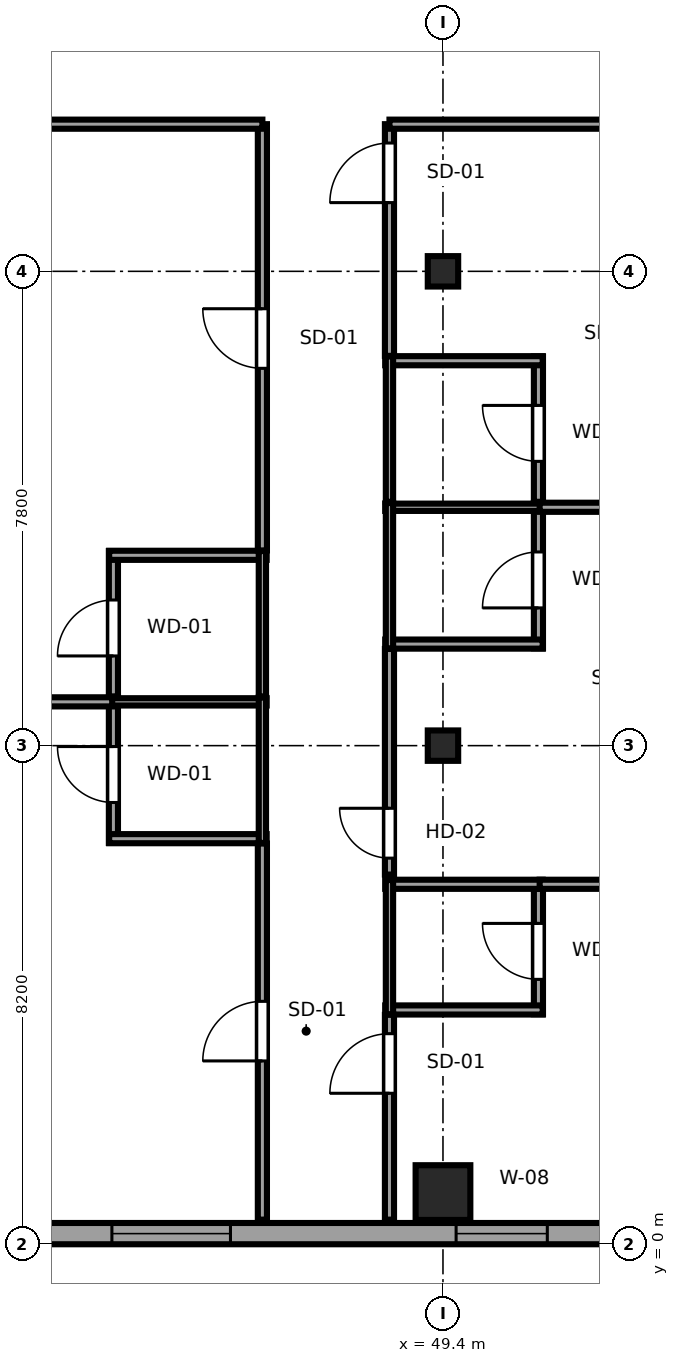
"""IFC4 building model, lengths in metres.
Left out: names, types, materials, properties, quantities, classifications, styles, units other than length and angle.
Written with IfcOpenShell. Run it as: python <this file> out.ifc"""

import sys

from ifc_helpers import new_model, si_unit, direction, frame, frame_2d, origin, origin_2d, place, context, subcontext, project, spatial, rectangle, i_section, extrude, source, transform, mapped, element, fill, save


model = new_model("IFC4")
c1 = context("Model", 3, precision=1e-05, world=origin(), true_north=direction((0.0, 1.0)))
c2 = subcontext(c1, "Body", "Model", "MODEL_VIEW")
j1 = project(units=[si_unit("LENGTHUNIT", "METRE"), si_unit("PLANEANGLEUNIT", "RADIAN")], contexts=[c1])
p1 = place(None, origin())
s1 = spatial("IfcSite", under=j1, at=p1, CompositionType="ELEMENT")
p2 = place(p1, origin())
s2 = spatial("IfcBuilding", under=s1, at=p2, CompositionType="ELEMENT")
p3 = place(p2, frame((0.0, 0.0, 100.9)))
s3 = spatial("IfcBuildingStorey", under=s2, at=p3, CompositionType="ELEMENT", Elevation=100.9)
m1 = source(origin(), c2, "Body", "SweptSolid", [
    extrude(rectangle(XDim=0.9, YDim=0.9, at=origin_2d()), origin(), (0.0, 0.0, 1.0), 3.55),
])
p4 = place(p3, frame((49.4, 0.85, 0.0), z_axis=(0.0, 0.0, 1.0), x_axis=(1.0, 0.0, 0.0)))
e1 = element("IfcColumn", 1, at=p4, inside=s3, PredefinedType="COLUMN", context=c2, shape_type="MappedRepresentation", body=[
    mapped(m1, transform((0.0, 0.0, 0.0), x_axis=(1.0, 0.0, 0.0), y_axis=(0.0, 1.0, 0.0), z_axis=(0.0, 0.0, 1.0), scale=1.0)),
])
m2 = source(origin(), c2, "Body", "SweptSolid", [
    extrude(i_section(OverallWidth=0.5, OverallDepth=0.5, WebThickness=0.022, FlangeThickness=0.034, at=origin_2d()), origin(), (0.0, 0.0, 1.0), 3.55),
])
for number, where, z_axis, x_axis in (
    (2, (49.4, 8.2, 0.0), (0.0, 0.0, 1.0), (1.0, 0.0, 0.0)),
    (3, (49.4, 16.0, 0.0), (0.0, 0.0, 1.0), (1.0, 0.0, 0.0)),
):
    element("IfcColumn", number, at=place(p3, frame(where, z_axis=z_axis, x_axis=x_axis)), inside=s3, PredefinedType="COLUMN", context=c2, shape_type="MappedRepresentation", body=[
        mapped(m2, transform((0.0, 0.0, 0.0), x_axis=(1.0, 0.0, 0.0), y_axis=(0.0, 1.0, 0.0), z_axis=(0.0, 0.0, 1.0), scale=1.0)),
    ])
p5 = place(p3, frame((34.375, 0.175, 0.0), z_axis=(0.0, 0.0, 1.0), x_axis=(1.0, 0.0, 0.0)))
e4 = element("IfcWall", 4, at=p5, inside=s3, PredefinedType="SOLIDWALL", context=c2, shape_type="SweptSolid", body=[
    extrude(rectangle(XDim=18.008, YDim=0.35, at=frame_2d((9.004, 0.0))), origin(), (0.0, 0.0, 1.0), 3.37),
])
p6 = place(p5, frame((1.726, 0.0, 0.68)))
e5 = element("IfcOpeningElement", 5, at=p6, cuts=e4, PredefinedType="OPENING", context=c2, shape_type="SweptSolid", body=[
    extrude(rectangle(XDim=1.95, YDim=1.82, at=frame_2d((0.975, 0.91))), frame((0.0, 0.185, 0.0), z_axis=(0.0, -1.0, 0.0), x_axis=(1.0, 0.0, 0.0)), (0.0, 0.0, 1.0), 0.37),
])
p7 = place(p5, frame((9.58, 0.0, 0.68)))
e6 = element("IfcOpeningElement", 6, at=p7, cuts=e4, PredefinedType="OPENING", context=c2, shape_type="SweptSolid", body=[
    extrude(rectangle(XDim=1.95, YDim=1.82, at=frame_2d((0.975, 0.91))), frame((0.0, 0.185, 0.0), z_axis=(0.0, -1.0, 0.0), x_axis=(1.0, 0.0, 0.0)), (0.0, 0.0, 1.0), 0.37),
])
p8 = place(p5, frame((15.241, 0.0, 0.62)))
e7 = element("IfcOpeningElement", 7, at=p8, cuts=e4, PredefinedType="OPENING", context=c2, shape_type="SweptSolid", body=[
    extrude(rectangle(XDim=1.5, YDim=1.55, at=frame_2d((0.75, 0.775))), frame((0.0, 0.185, 0.0), z_axis=(0.0, -1.0, 0.0), x_axis=(1.0, 0.0, 0.0)), (0.0, 0.0, 1.0), 0.37),
])
p9 = place(p3, frame((43.98, 6.6, 0.0), z_axis=(0.0, 0.0, 1.0), x_axis=(0.0, 1.0, 0.0)))
e8 = element("IfcWall", 8, at=p9, inside=s3, PredefinedType="PARTITIONING", context=c2, shape_type="SweptSolid", body=[
    extrude(rectangle(XDim=2.39, YDim=0.15, at=frame_2d((1.195, 0.0))), origin(), (0.0, 0.0, 1.0), 3.37),
])
p10 = place(p9, frame((0.665, 0.0, 0.0)))
e9 = element("IfcOpeningElement", 9, at=p10, cuts=e8, PredefinedType="OPENING", context=c2, shape_type="SweptSolid", body=[
    extrude(rectangle(XDim=0.92, YDim=2.01, at=frame_2d((0.46, 1.005))), frame((0.0, 0.085, 0.0), z_axis=(0.0, -1.0, 0.0), x_axis=(1.0, 0.0, 0.0)), (0.0, 0.0, 1.0), 0.17),
])
p11 = place(p3, frame((43.91, 6.67, 0.0), z_axis=(0.0, 0.0, 1.0), x_axis=(1.0, 0.0, 0.0)))
e10 = element("IfcWall", 10, at=p11, inside=s3, PredefinedType="PARTITIONING", context=c2, shape_type="SweptSolid", body=[
    extrude(rectangle(XDim=2.59, YDim=0.15, at=frame_2d((1.295, 0.0))), origin(), (0.0, 0.0, 1.0), 3.37),
])
p12 = place(p3, frame((43.91, 8.92, 0.0), z_axis=(0.0, 0.0, 1.0), x_axis=(1.0, 0.0, 0.0)))
e11 = element("IfcWall", 11, at=p12, inside=s3, PredefinedType="PLUMBINGWALL", context=c2, shape_type="SweptSolid", body=[
    extrude(rectangle(XDim=2.59, YDim=0.12, at=frame_2d((1.295, 0.0))), origin(), (0.0, 0.0, 1.0), 3.37),
])
p13 = place(p3, frame((46.43, 6.6, 0.0), z_axis=(0.0, 0.0, 1.0), x_axis=(0.0, 1.0, 0.0)))
e12 = element("IfcWall", 12, at=p13, inside=s3, PredefinedType="PLUMBINGWALL", context=c2, shape_type="SweptSolid", body=[
    extrude(rectangle(XDim=2.39, YDim=0.12, at=frame_2d((1.195, 0.0))), origin(), (0.0, 0.0, 1.0), 3.37),
])
p14 = place(p3, frame((43.98, 9.01, 0.0), z_axis=(0.0, 0.0, 1.0), x_axis=(0.0, 1.0, 0.0)))
e13 = element("IfcWall", 13, at=p14, inside=s3, PredefinedType="PARTITIONING", context=c2, shape_type="SweptSolid", body=[
    extrude(rectangle(XDim=2.39, YDim=0.15, at=frame_2d((1.195, 0.0))), origin(), (0.0, 0.0, 1.0), 3.37),
])
p15 = place(p14, frame((0.665, 0.0, 0.0)))
e14 = element("IfcOpeningElement", 14, at=p15, cuts=e13, PredefinedType="OPENING", context=c2, shape_type="SweptSolid", body=[
    extrude(rectangle(XDim=0.92, YDim=2.01, at=frame_2d((0.46, 1.005))), frame((0.0, 0.085, 0.0), z_axis=(0.0, -1.0, 0.0), x_axis=(1.0, 0.0, 0.0)), (0.0, 0.0, 1.0), 0.17),
])
p16 = place(p3, frame((43.91, 11.33, 0.0), z_axis=(0.0, 0.0, 1.0), x_axis=(1.0, 0.0, 0.0)))
e15 = element("IfcWall", 15, at=p16, inside=s3, PredefinedType="PARTITIONING", context=c2, shape_type="SweptSolid", body=[
    extrude(rectangle(XDim=2.59, YDim=0.15, at=frame_2d((1.295, 0.0))), origin(), (0.0, 0.0, 1.0), 3.37),
])
p17 = place(p3, frame((46.43, 9.01, 0.0), z_axis=(0.0, 0.0, 1.0), x_axis=(0.0, 1.0, 0.0)))
e16 = element("IfcWall", 16, at=p17, inside=s3, PredefinedType="PLUMBINGWALL", context=c2, shape_type="SweptSolid", body=[
    extrude(rectangle(XDim=2.39, YDim=0.12, at=frame_2d((1.195, 0.0))), origin(), (0.0, 0.0, 1.0), 3.37),
])
p18 = place(p3, frame((50.97, 3.783, 0.0), z_axis=(0.0, 0.0, 1.0), x_axis=(0.0, 1.0, 0.0)))
e17 = element("IfcWall", 17, at=p18, inside=s3, PredefinedType="PARTITIONING", context=c2, shape_type="SweptSolid", body=[
    extrude(rectangle(XDim=2.207, YDim=0.15, at=frame_2d((1.104, 0.0))), origin(), (0.0, 0.0, 1.0), 3.37),
])
p19 = place(p18, frame((0.573, 0.0, 0.0)))
e18 = element("IfcOpeningElement", 18, at=p19, cuts=e17, PredefinedType="OPENING", context=c2, shape_type="SweptSolid", body=[
    extrude(rectangle(XDim=0.92, YDim=2.01, at=frame_2d((0.46, 1.005))), frame((0.0, 0.085, 0.0), z_axis=(0.0, -1.0, 0.0), x_axis=(1.0, 0.0, 0.0)), (0.0, 0.0, 1.0), 0.17),
])
for number, where, z_axis, x_axis in (
    (19, (48.45, 3.853, 0.0), (0.0, 0.0, 1.0), (1.0, 0.0, 0.0)),
    (20, (48.45, 5.92, 0.0), (0.0, 0.0, 1.0), (1.0, 0.0, 0.0)),
):
    element("IfcWall", number, at=place(p3, frame(where, z_axis=z_axis, x_axis=x_axis)), inside=s3, PredefinedType="PARTITIONING", context=c2, shape_type="SweptSolid", body=[
        extrude(rectangle(XDim=2.59, YDim=0.15, at=frame_2d((1.295, 0.0))), origin(), (0.0, 0.0, 1.0), 3.37),
    ])
p20 = place(p3, frame((48.52, 3.783, 0.0), z_axis=(0.0, 0.0, 1.0), x_axis=(0.0, 1.0, 0.0)))
e21 = element("IfcWall", 21, at=p20, inside=s3, PredefinedType="PLUMBINGWALL", context=c2, shape_type="SweptSolid", body=[
    extrude(rectangle(XDim=2.207, YDim=0.12, at=frame_2d((1.104, 0.0))), origin(), (0.0, 0.0, 1.0), 3.37),
])
p21 = place(p3, frame((50.97, 9.8, 0.0), z_axis=(0.0, 0.0, 1.0), x_axis=(0.0, 1.0, 0.0)))
e22 = element("IfcWall", 22, at=p21, inside=s3, PredefinedType="PARTITIONING", context=c2, shape_type="SweptSolid", body=[
    extrude(rectangle(XDim=2.39, YDim=0.15, at=frame_2d((1.195, 0.0))), origin(), (0.0, 0.0, 1.0), 3.37),
])
p22 = place(p21, frame((0.665, 0.0, 0.0)))
e23 = element("IfcOpeningElement", 23, at=p22, cuts=e22, PredefinedType="OPENING", context=c2, shape_type="SweptSolid", body=[
    extrude(rectangle(XDim=0.92, YDim=2.01, at=frame_2d((0.46, 1.005))), frame((0.0, 0.085, 0.0), z_axis=(0.0, -1.0, 0.0), x_axis=(1.0, 0.0, 0.0)), (0.0, 0.0, 1.0), 0.17),
])
p23 = place(p3, frame((48.45, 9.87, 0.0), z_axis=(0.0, 0.0, 1.0), x_axis=(1.0, 0.0, 0.0)))
e24 = element("IfcWall", 24, at=p23, inside=s3, PredefinedType="PARTITIONING", context=c2, shape_type="SweptSolid", body=[
    extrude(rectangle(XDim=2.59, YDim=0.15, at=frame_2d((1.295, 0.0))), origin(), (0.0, 0.0, 1.0), 3.37),
])
p24 = place(p3, frame((48.45, 12.12, 0.0), z_axis=(0.0, 0.0, 1.0), x_axis=(1.0, 0.0, 0.0)))
e25 = element("IfcWall", 25, at=p24, inside=s3, PredefinedType="PLUMBINGWALL", context=c2, shape_type="SweptSolid", body=[
    extrude(rectangle(XDim=2.59, YDim=0.12, at=frame_2d((1.295, 0.0))), origin(), (0.0, 0.0, 1.0), 3.37),
])
p25 = place(p3, frame((48.52, 9.8, 0.0), z_axis=(0.0, 0.0, 1.0), x_axis=(0.0, 1.0, 0.0)))
e26 = element("IfcWall", 26, at=p25, inside=s3, PredefinedType="PLUMBINGWALL", context=c2, shape_type="SweptSolid", body=[
    extrude(rectangle(XDim=2.39, YDim=0.12, at=frame_2d((1.195, 0.0))), origin(), (0.0, 0.0, 1.0), 3.37),
])
p26 = place(p3, frame((50.97, 12.21, 0.0), z_axis=(0.0, 0.0, 1.0), x_axis=(0.0, 1.0, 0.0)))
e27 = element("IfcWall", 27, at=p26, inside=s3, PredefinedType="PARTITIONING", context=c2, shape_type="SweptSolid", body=[
    extrude(rectangle(XDim=2.39, YDim=0.15, at=frame_2d((1.195, 0.0))), origin(), (0.0, 0.0, 1.0), 3.37),
])
p27 = place(p26, frame((0.665, 0.0, 0.0)))
e28 = element("IfcOpeningElement", 28, at=p27, cuts=e27, PredefinedType="OPENING", context=c2, shape_type="SweptSolid", body=[
    extrude(rectangle(XDim=0.92, YDim=2.01, at=frame_2d((0.46, 1.005))), frame((0.0, 0.085, 0.0), z_axis=(0.0, -1.0, 0.0), x_axis=(1.0, 0.0, 0.0)), (0.0, 0.0, 1.0), 0.17),
])
p28 = place(p3, frame((48.45, 14.53, 0.0), z_axis=(0.0, 0.0, 1.0), x_axis=(1.0, 0.0, 0.0)))
e29 = element("IfcWall", 29, at=p28, inside=s3, PredefinedType="PARTITIONING", context=c2, shape_type="SweptSolid", body=[
    extrude(rectangle(XDim=2.59, YDim=0.15, at=frame_2d((1.295, 0.0))), origin(), (0.0, 0.0, 1.0), 3.37),
])
p29 = place(p3, frame((48.52, 12.21, 0.0), z_axis=(0.0, 0.0, 1.0), x_axis=(0.0, 1.0, 0.0)))
e30 = element("IfcWall", 30, at=p29, inside=s3, PredefinedType="PLUMBINGWALL", context=c2, shape_type="SweptSolid", body=[
    extrude(rectangle(XDim=2.39, YDim=0.12, at=frame_2d((1.195, 0.0))), origin(), (0.0, 0.0, 1.0), 3.37),
])
p30 = place(p3, frame((46.43, 0.405, 0.0), z_axis=(0.0, 0.0, 1.0), x_axis=(0.0, 1.0, 0.0)))
e31 = element("IfcWall", 31, at=p30, inside=s3, PredefinedType="PARTITIONING", context=c2, shape_type="SweptSolid", body=[
    extrude(rectangle(XDim=6.185, YDim=0.15, at=frame_2d((3.093, 0.0))), origin(), (0.0, 0.0, 1.0), 3.37),
])
p31 = place(p30, frame((2.61, 0.0, 0.0)))
e32 = element("IfcOpeningElement", 32, at=p31, cuts=e31, PredefinedType="OPENING", context=c2, shape_type="SweptSolid", body=[
    extrude(rectangle(XDim=0.98, YDim=2.12, at=frame_2d((0.49, 1.06))), frame((0.0, 0.085, 0.0), z_axis=(0.0, -1.0, 0.0), x_axis=(1.0, 0.0, 0.0)), (0.0, 0.0, 1.0), 0.17),
])
p32 = place(p3, frame((34.65, 8.92, 0.0), z_axis=(0.0, 0.0, 1.0), x_axis=(1.0, 0.0, 0.0)))
e33 = element("IfcWall", 33, at=p32, inside=s3, PredefinedType="PARTITIONING", context=c2, shape_type="SweptSolid", body=[
    extrude(rectangle(XDim=9.31, YDim=0.15, at=frame_2d((4.655, 0.0))), origin(), (0.0, 0.0, 1.0), 3.37),
])
p33 = place(p3, frame((46.43, 11.41, 0.0), z_axis=(0.0, 0.0, 1.0), x_axis=(0.0, 1.0, 0.0)))
e34 = element("IfcWall", 34, at=p33, inside=s3, PredefinedType="PARTITIONING", context=c2, shape_type="SweptSolid", body=[
    extrude(rectangle(XDim=7.01, YDim=0.15, at=frame_2d((3.505, 0.0))), origin(), (0.0, 0.0, 1.0), 3.37),
])
p34 = place(p33, frame((2.995, 0.0, 0.0)))
e35 = element("IfcOpeningElement", 35, at=p34, cuts=e34, PredefinedType="OPENING", context=c2, shape_type="SweptSolid", body=[
    extrude(rectangle(XDim=0.98, YDim=2.12, at=frame_2d((0.49, 1.06))), frame((0.0, 0.085, 0.0), z_axis=(0.0, -1.0, 0.0), x_axis=(1.0, 0.0, 0.0)), (0.0, 0.0, 1.0), 0.17),
])
p35 = place(p3, frame((34.65, 18.42, 0.0), z_axis=(0.0, 0.0, 1.0), x_axis=(1.0, 0.0, 0.0)))
e36 = element("IfcWall", 36, at=p35, inside=s3, PredefinedType="PARTITIONING", context=c2, shape_type="SweptSolid", body=[
    extrude(rectangle(XDim=11.78, YDim=0.15, at=frame_2d((5.89, 0.0))), origin(), (0.0, 0.0, 1.0), 3.37),
])
p36 = place(p3, frame((48.52, 0.405, 0.0), z_axis=(0.0, 0.0, 1.0), x_axis=(0.0, 1.0, 0.0)))
e37 = element("IfcWall", 37, at=p36, inside=s3, PredefinedType="PARTITIONING", context=c2, shape_type="SweptSolid", body=[
    extrude(rectangle(XDim=3.368, YDim=0.15, at=frame_2d((1.684, 0.0))), origin(), (0.0, 0.0, 1.0), 3.37),
])
p37 = place(p36, frame((2.078, 0.0, 0.0)))
e38 = element("IfcOpeningElement", 38, at=p37, cuts=e37, PredefinedType="OPENING", context=c2, shape_type="SweptSolid", body=[
    extrude(rectangle(XDim=0.98, YDim=2.12, at=frame_2d((0.49, 1.06))), frame((0.0, 0.085, 0.0), z_axis=(0.0, -1.0, 0.0), x_axis=(1.0, 0.0, 0.0)), (0.0, 0.0, 1.0), 0.17),
])
p38 = place(p3, frame((50.99, 5.92, 0.0), z_axis=(0.0, 0.0, 1.0), x_axis=(1.0, 0.0, 0.0)))
e39 = element("IfcWall", 39, at=p38, inside=s3, PredefinedType="PARTITIONING", context=c2, shape_type="SweptSolid", body=[
    extrude(rectangle(XDim=5.605, YDim=0.15, at=frame_2d((2.802, 0.0))), origin(), (0.0, 0.0, 1.0), 3.37),
])
p39 = place(p3, frame((48.52, 6.08, 0.0), z_axis=(0.0, 0.0, 1.0), x_axis=(0.0, 1.0, 0.0)))
e40 = element("IfcWall", 40, at=p39, inside=s3, PredefinedType="PARTITIONING", context=c2, shape_type="SweptSolid", body=[
    extrude(rectangle(XDim=3.71, YDim=0.15, at=frame_2d((1.855, 0.0))), origin(), (0.0, 0.0, 1.0), 3.37),
])
p40 = place(p39, frame((0.27, 0.0, 0.0)))
e41 = element("IfcOpeningElement", 41, at=p40, cuts=e40, PredefinedType="OPENING", context=c2, shape_type="SweptSolid", body=[
    extrude(rectangle(XDim=0.82, YDim=2.01, at=frame_2d((0.41, 1.005))), frame((0.0, 0.085, 0.0), z_axis=(0.0, -1.0, 0.0), x_axis=(1.0, 0.0, 0.0)), (0.0, 0.0, 1.0), 0.17),
])
p41 = place(p3, frame((50.99, 12.12, 0.0), z_axis=(0.0, 0.0, 1.0), x_axis=(1.0, 0.0, 0.0)))
e42 = element("IfcWall", 42, at=p41, inside=s3, PredefinedType="PARTITIONING", context=c2, shape_type="SweptSolid", body=[
    extrude(rectangle(XDim=5.605, YDim=0.15, at=frame_2d((2.802, 0.0))), origin(), (0.0, 0.0, 1.0), 3.37),
])
p42 = place(p3, frame((48.52, 14.61, 0.0), z_axis=(0.0, 0.0, 1.0), x_axis=(0.0, 1.0, 0.0)))
e43 = element("IfcWall", 43, at=p42, inside=s3, PredefinedType="PARTITIONING", context=c2, shape_type="SweptSolid", body=[
    extrude(rectangle(XDim=3.81, YDim=0.15, at=frame_2d((1.905, 0.0))), origin(), (0.0, 0.0, 1.0), 3.37),
])
p43 = place(p42, frame((2.52, 0.0, 0.0)))
e44 = element("IfcOpeningElement", 44, at=p43, cuts=e43, PredefinedType="OPENING", context=c2, shape_type="SweptSolid", body=[
    extrude(rectangle(XDim=0.98, YDim=2.12, at=frame_2d((0.49, 1.06))), frame((0.0, 0.085, 0.0), z_axis=(0.0, -1.0, 0.0), x_axis=(1.0, 0.0, 0.0)), (0.0, 0.0, 1.0), 0.17),
])
p44 = place(p3, frame((48.52, 18.42, 0.0), z_axis=(0.0, 0.0, 1.0), x_axis=(1.0, 0.0, 0.0)))
e45 = element("IfcWall", 45, at=p44, inside=s3, PredefinedType="PARTITIONING", context=c2, shape_type="SweptSolid", body=[
    extrude(rectangle(XDim=8.075, YDim=0.15, at=frame_2d((4.038, 0.0))), origin(), (0.0, 0.0, 1.0), 3.37),
])
m3 = source(origin(), c2, "Body", "SweptSolid", [
    extrude(rectangle(XDim=1.95, YDim=1.82, at=frame_2d((0.975, 0.91))), frame((0.0, 0.09, 0.0), z_axis=(0.0, -1.0, 0.0), x_axis=(1.0, 0.0, 0.0)), (0.0, 0.0, 1.0), 0.06),
])
p45 = place(p7, origin())
e46 = element("IfcWindow", 46, at=p45, inside=s3, PartitioningType="DOUBLE_PANEL_VERTICAL", PredefinedType="WINDOW", context=c2, shape_type="MappedRepresentation", body=[
    mapped(m3, transform((0.0, 0.0, 0.0), x_axis=(1.0, 0.0, 0.0), y_axis=(0.0, 1.0, 0.0), z_axis=(0.0, 0.0, 1.0), scale=1.0)),
])
fill(e6, e46)
m4 = source(origin(), c2, "Body", "SweptSolid", [
    extrude(rectangle(XDim=1.5, YDim=1.55, at=frame_2d((0.75, 0.775))), frame((0.0, 0.09, 0.0), z_axis=(0.0, -1.0, 0.0), x_axis=(1.0, 0.0, 0.0)), (0.0, 0.0, 1.0), 0.06),
])
p46 = place(p8, origin())
e47 = element("IfcWindow", 47, at=p46, inside=s3, PartitioningType="SINGLE_PANEL", PredefinedType="WINDOW", context=c2, shape_type="MappedRepresentation", body=[
    mapped(m4, transform((0.0, 0.0, 0.0), x_axis=(1.0, 0.0, 0.0), y_axis=(0.0, 1.0, 0.0), z_axis=(0.0, 0.0, 1.0), scale=1.0)),
])
fill(e7, e47)
m5 = source(origin(), c2, "Body", "SweptSolid", [
    extrude(rectangle(XDim=0.92, YDim=2.01, at=frame_2d((0.46, 1.005))), frame((0.0, 0.025, 0.0), z_axis=(0.0, -1.0, 0.0), x_axis=(1.0, 0.0, 0.0)), (0.0, 0.0, 1.0), 0.05),
])
p47 = place(p10, origin())
e48 = element("IfcDoor", 48, at=p47, inside=s3, OperationType="SINGLE_SWING_RIGHT", PredefinedType="DOOR", context=c2, shape_type="MappedRepresentation", body=[
    mapped(m5, transform((0.0, 0.0, 0.0), x_axis=(1.0, 0.0, 0.0), y_axis=(0.0, 1.0, 0.0), z_axis=(0.0, 0.0, 1.0), scale=1.0)),
])
fill(e9, e48)
p48 = place(p15, origin())
e49 = element("IfcDoor", 49, at=p48, inside=s3, OperationType="SINGLE_SWING_LEFT", PredefinedType="DOOR", context=c2, shape_type="MappedRepresentation", body=[
    mapped(m5, transform((0.0, 0.0, 0.0), x_axis=(1.0, 0.0, 0.0), y_axis=(0.0, 1.0, 0.0), z_axis=(0.0, 0.0, 1.0), scale=1.0)),
])
fill(e14, e49)
p49 = place(p19, origin())
e50 = element("IfcDoor", 50, at=p49, inside=s3, OperationType="SINGLE_SWING_RIGHT", PredefinedType="DOOR", context=c2, shape_type="MappedRepresentation", body=[
    mapped(m5, transform((0.0, 0.0, 0.0), x_axis=(1.0, 0.0, 0.0), y_axis=(0.0, 1.0, 0.0), z_axis=(0.0, 0.0, 1.0), scale=1.0)),
])
fill(e18, e50)
p50 = place(p22, origin())
e51 = element("IfcDoor", 51, at=p50, inside=s3, OperationType="SINGLE_SWING_LEFT", PredefinedType="DOOR", context=c2, shape_type="MappedRepresentation", body=[
    mapped(m5, transform((0.0, 0.0, 0.0), x_axis=(1.0, 0.0, 0.0), y_axis=(0.0, 1.0, 0.0), z_axis=(0.0, 0.0, 1.0), scale=1.0)),
])
fill(e23, e51)
p51 = place(p27, origin())
e52 = element("IfcDoor", 52, at=p51, inside=s3, OperationType="SINGLE_SWING_RIGHT", PredefinedType="DOOR", context=c2, shape_type="MappedRepresentation", body=[
    mapped(m5, transform((0.0, 0.0, 0.0), x_axis=(1.0, 0.0, 0.0), y_axis=(0.0, 1.0, 0.0), z_axis=(0.0, 0.0, 1.0), scale=1.0)),
])
fill(e28, e52)
m6 = source(origin(), c2, "Body", "SweptSolid", [
    extrude(rectangle(XDim=0.98, YDim=2.12, at=frame_2d((0.49, 1.06))), frame((0.0, 0.025, 0.0), z_axis=(0.0, -1.0, 0.0), x_axis=(1.0, 0.0, 0.0)), (0.0, 0.0, 1.0), 0.05),
])
p52 = place(p31, origin())
e53 = element("IfcDoor", 53, at=p52, inside=s3, OperationType="SINGLE_SWING_LEFT", PredefinedType="DOOR", context=c2, shape_type="MappedRepresentation", body=[
    mapped(m6, transform((0.0, 0.0, 0.0), x_axis=(1.0, 0.0, 0.0), y_axis=(0.0, 1.0, 0.0), z_axis=(0.0, 0.0, 1.0), scale=1.0)),
])
fill(e32, e53)
p53 = place(p34, origin())
e54 = element("IfcDoor", 54, at=p53, inside=s3, OperationType="SINGLE_SWING_RIGHT", PredefinedType="DOOR", context=c2, shape_type="MappedRepresentation", body=[
    mapped(m6, transform((0.0, 0.0, 0.0), x_axis=(1.0, 0.0, 0.0), y_axis=(0.0, 1.0, 0.0), z_axis=(0.0, 0.0, 1.0), scale=1.0)),
])
fill(e35, e54)
p54 = place(p37, origin())
e55 = element("IfcDoor", 55, at=p54, inside=s3, OperationType="SINGLE_SWING_LEFT", PredefinedType="DOOR", context=c2, shape_type="MappedRepresentation", body=[
    mapped(m6, transform((0.0, 0.0, 0.0), x_axis=(1.0, 0.0, 0.0), y_axis=(0.0, 1.0, 0.0), z_axis=(0.0, 0.0, 1.0), scale=1.0)),
])
fill(e38, e55)
m7 = source(origin(), c2, "Body", "SweptSolid", [
    extrude(rectangle(XDim=0.82, YDim=2.01, at=frame_2d((0.41, 1.005))), frame((0.0, 0.025, 0.0), z_axis=(0.0, -1.0, 0.0), x_axis=(1.0, 0.0, 0.0)), (0.0, 0.0, 1.0), 0.05),
])
p55 = place(p40, origin())
e56 = element("IfcDoor", 56, at=p55, inside=s3, OperationType="SINGLE_SWING_RIGHT", PredefinedType="DOOR", context=c2, shape_type="MappedRepresentation", body=[
    mapped(m7, transform((0.0, 0.0, 0.0), x_axis=(1.0, 0.0, 0.0), y_axis=(0.0, 1.0, 0.0), z_axis=(0.0, 0.0, 1.0), scale=1.0)),
])
fill(e41, e56)
p56 = place(p43, origin())
e57 = element("IfcDoor", 57, at=p56, inside=s3, OperationType="SINGLE_SWING_LEFT", PredefinedType="DOOR", context=c2, shape_type="MappedRepresentation", body=[
    mapped(m6, transform((0.0, 0.0, 0.0), x_axis=(1.0, 0.0, 0.0), y_axis=(0.0, 1.0, 0.0), z_axis=(0.0, 0.0, 1.0), scale=1.0)),
])
fill(e44, e57)
save(model, sys.argv[1])
